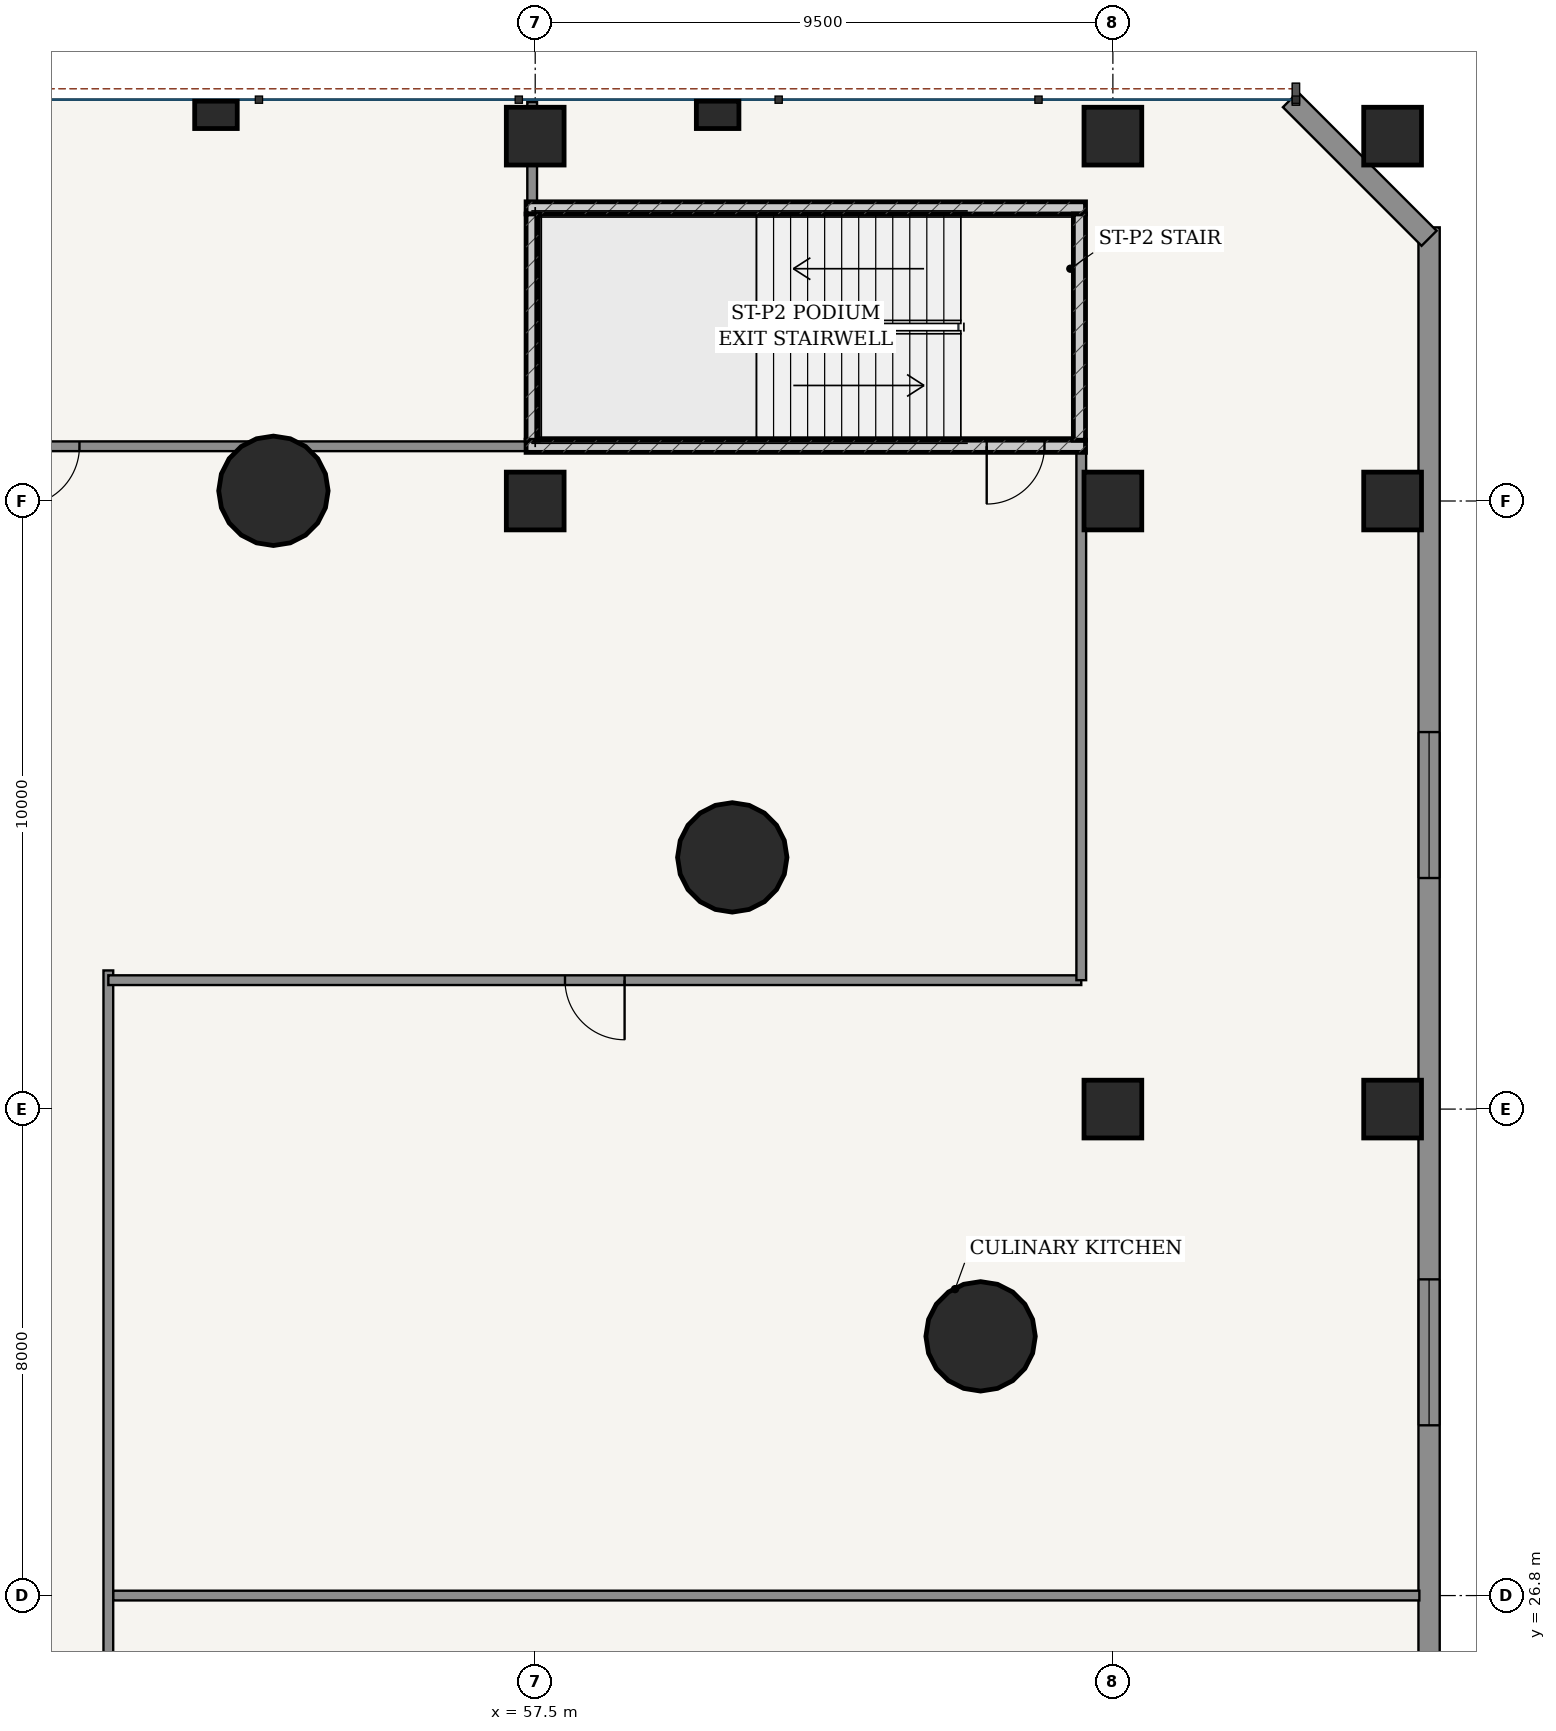
"""IFC4 building model, lengths in metres.
Left out: names, types, materials, properties, quantities, classifications, styles, units other than length and angle.
Written with IfcOpenShell. Run it as: python <this file> out.ifc"""

import sys

from ifc_helpers import new_model, si_unit, direction, frame, frame_2d, origin, origin_2d, place, context, subcontext, project, spatial, rectangle, hollow_circle, extrude, source, transform, mapped, element, fill, save


model = new_model("IFC4")
c1 = context("Model", 3, precision=1e-05, world=origin(), true_north=direction((-0.2419218956, 0.970295726276)))
c2 = subcontext(c1, "Body", "Model", "MODEL_VIEW")
j1 = project(units=[si_unit("LENGTHUNIT", "METRE"), si_unit("PLANEANGLEUNIT", "RADIAN")], contexts=[c1])
p1 = place(None, origin())
s1 = spatial("IfcSite", under=j1, at=p1, CompositionType="ELEMENT")
p2 = place(p1, origin())
s2 = spatial("IfcBuilding", under=s1, at=p2, CompositionType="ELEMENT")
p3 = place(p2, frame((0.0, 0.0, 5.4)))
s3 = spatial("IfcBuildingStorey", under=s2, at=p3, CompositionType="ELEMENT", Elevation=5.4)
p4 = place(p3, frame((57.35, 45.7, 0.0), z_axis=(0.0, 0.0, 1.0), x_axis=(1.0, 0.0, 0.0)))
e1 = element("IfcWall", 1, at=p4, inside=s3, PredefinedType="SOLIDWALL", context=c2, shape_type="SweptSolid", body=[
    extrude(rectangle(XDim=9.2, YDim=0.2, at=frame_2d((4.6, 0.0))), origin(), (0.0, 0.0, 1.0), 4.2),
])
p5 = place(p4, frame((7.575, 0.0, 0.0)))
e2 = element("IfcOpeningElement", 2, at=p5, cuts=e1, PredefinedType="OPENING", context=c2, shape_type="SweptSolid", body=[
    extrude(rectangle(XDim=0.95, YDim=2.15, at=frame_2d((0.475, 1.075))), frame((0.0, 0.11, 0.0), z_axis=(0.0, -1.0, 0.0), x_axis=(1.0, 0.0, 0.0)), (0.0, 0.0, 1.0), 0.22),
])
p6 = place(p3, frame((57.35, 49.62, 0.0), z_axis=(0.0, 0.0, 1.0), x_axis=(1.0, 0.0, 0.0)))
e3 = element("IfcWall", 3, at=p6, inside=s3, PredefinedType="SOLIDWALL", context=c2, shape_type="SweptSolid", body=[
    extrude(rectangle(XDim=9.2, YDim=0.2, at=frame_2d((4.6, 0.0))), origin(), (0.0, 0.0, 1.0), 4.2),
])
for number, where, z_axis, x_axis in (
    (4, (57.45, 45.8, 0.0), (0.0, 0.0, 1.0), (0.0, 1.0, 0.0)),
    (5, (66.45, 45.8, 0.0), (0.0, 0.0, 1.0), (0.0, 1.0, 0.0)),
):
    element("IfcWall", number, at=place(p3, frame(where, z_axis=z_axis, x_axis=x_axis)), inside=s3, PredefinedType="SOLIDWALL", context=c2, shape_type="SweptSolid", body=[
        extrude(rectangle(XDim=3.72, YDim=0.2, at=frame_2d((1.86, 0.0))), origin(), (0.0, 0.0, 1.0), 4.2),
    ])
for number, where, z_axis, x_axis in (
    (6, (64.824, 31.063, 0.0), (0.0, 0.0, 1.0), (1.0, 0.0, 0.0)),
    (7, (60.741, 38.939, 0.0), (0.0, 0.0, 1.0), (1.0, 0.0, 0.0)),
    (8, (53.195, 44.968, 0.0), (0.0, 0.0, 1.0), (1.0, 0.0, 0.0)),
):
    element("IfcColumn", number, at=place(p3, frame(where, z_axis=z_axis, x_axis=x_axis)), inside=s3, PredefinedType="COLUMN", context=c2, shape_type="SweptSolid", body=[
        extrude(hollow_circle(Radius=0.9, WallThickness=0.055, at=origin_2d()), origin(), (0.0, 0.0, 1.0), 4.5),
    ])
for number, where, z_axis, x_axis in (
    (9, (57.5, 44.8, 0.0), (0.0, 0.0, 1.0), (1.0, 0.0, 0.0)),
    (10, (57.5, 50.8, 0.0), (0.0, 0.0, 1.0), (1.0, 0.0, 0.0)),
    (11, (67.0, 34.8, 0.0), (0.0, 0.0, 1.0), (1.0, 0.0, 0.0)),
    (12, (67.0, 44.8, 0.0), (0.0, 0.0, 1.0), (1.0, 0.0, 0.0)),
    (13, (67.0, 50.8, 0.0), (0.0, 0.0, 1.0), (1.0, 0.0, 0.0)),
    (14, (71.6, 34.8, 0.0), (0.0, 0.0, 1.0), (1.0, 0.0, 0.0)),
    (15, (71.6, 44.8, 0.0), (0.0, 0.0, 1.0), (1.0, 0.0, 0.0)),
    (16, (71.6, 50.8, 0.0), (0.0, 0.0, 1.0), (1.0, 0.0, 0.0)),
):
    element("IfcColumn", number, at=place(p3, frame(where, z_axis=z_axis, x_axis=x_axis)), inside=s3, PredefinedType="COLUMN", context=c2, shape_type="SweptSolid", body=[
        extrude(rectangle(XDim=0.95, YDim=0.95, at=origin_2d()), origin(), (0.0, 0.0, 1.0), 4.5),
    ])
for number, where, z_axis, x_axis in (
    (17, (52.25, 51.15, 0.0), (0.0, 0.0, 1.0), (1.0, 0.0, 0.0)),
    (18, (60.5, 51.15, 0.0), (0.0, 0.0, 1.0), (1.0, 0.0, 0.0)),
):
    element("IfcColumn", number, at=place(p3, frame(where, z_axis=z_axis, x_axis=x_axis)), inside=s3, PredefinedType="PILASTER", context=c2, shape_type="SweptSolid", body=[
        extrude(rectangle(XDim=0.7, YDim=0.45, at=origin_2d()), origin(), (0.0, 0.0, 1.0), 4.5),
    ])
p7 = place(p3, frame((72.2, 4.3, 0.0), z_axis=(0.0, 0.0, 1.0), x_axis=(0.0, 1.0, 0.0)))
e19 = element("IfcWall", 19, at=p7, inside=s3, PredefinedType="SOLIDWALL", context=c2, shape_type="SweptSolid", body=[
    extrude(rectangle(XDim=45.0, YDim=0.35, at=frame_2d((22.5, 0.0))), origin(), (0.0, 0.0, 1.0), 4.2),
])
p8 = place(p7, frame((8.3, 0.0, 0.85)))
e20 = element("IfcOpeningElement", 20, at=p8, cuts=e19, PredefinedType="OPENING", context=c2, shape_type="SweptSolid", body=[
    extrude(rectangle(XDim=2.4, YDim=2.2, at=frame_2d((1.2, 1.1))), frame((0.0, 0.185, 0.0), z_axis=(0.0, -1.0, 0.0), x_axis=(1.0, 0.0, 0.0)), (0.0, 0.0, 1.0), 0.37),
])
p9 = place(p7, frame((25.3, 0.0, 0.85)))
e21 = element("IfcOpeningElement", 21, at=p9, cuts=e19, PredefinedType="OPENING", context=c2, shape_type="SweptSolid", body=[
    extrude(rectangle(XDim=2.4, YDim=2.2, at=frame_2d((1.2, 1.1))), frame((0.0, 0.185, 0.0), z_axis=(0.0, -1.0, 0.0), x_axis=(1.0, 0.0, 0.0)), (0.0, 0.0, 1.0), 0.37),
])
p10 = place(p7, frame((34.3, 0.0, 0.85)))
e22 = element("IfcOpeningElement", 22, at=p10, cuts=e19, PredefinedType="OPENING", context=c2, shape_type="SweptSolid", body=[
    extrude(rectangle(XDim=2.4, YDim=2.2, at=frame_2d((1.2, 1.1))), frame((0.0, 0.185, 0.0), z_axis=(0.0, -1.0, 0.0), x_axis=(1.0, 0.0, 0.0)), (0.0, 0.0, 1.0), 0.37),
])
p11 = place(p3, frame((72.2, 49.12, 0.0), z_axis=(0.0, 0.0, 1.0), x_axis=(-0.707144639935, 0.707068920411, 0.0)))
e23 = element("IfcWall", 23, at=p11, inside=s3, PredefinedType="SOLIDWALL", context=c2, shape_type="SweptSolid", body=[
    extrude(rectangle(XDim=3.224, YDim=0.35, at=frame_2d((1.612, 0.0))), origin(), (0.0, 0.0, 1.0), 3.235),
])
p12 = place(p3, frame((50.48, 15.52, 0.0), z_axis=(0.0, 0.0, 1.0), x_axis=(0.0, 1.0, 0.0)))
e24 = element("IfcWall", 24, at=p12, inside=s3, PredefinedType="PARTITIONING", context=c2, shape_type="SweptSolid", body=[
    extrude(rectangle(XDim=21.56, YDim=0.16, at=frame_2d((10.78, 0.0))), origin(), (0.0, 0.0, 1.0), 3.55),
])
p13 = place(p12, frame((5.254, 0.0, 0.0)))
e25 = element("IfcOpeningElement", 25, at=p13, cuts=e24, PredefinedType="OPENING", context=c2, shape_type="SweptSolid", body=[
    extrude(rectangle(XDim=0.98, YDim=2.2, at=frame_2d((0.49, 1.1))), frame((0.0, 0.09, 0.0), z_axis=(0.0, -1.0, 0.0), x_axis=(1.0, 0.0, 0.0)), (0.0, 0.0, 1.0), 0.18),
])
p14 = place(p3, frame((50.48, 36.92, 0.0), z_axis=(0.0, 0.0, 1.0), x_axis=(1.0, 0.0, 0.0)))
e26 = element("IfcWall", 26, at=p14, inside=s3, PredefinedType="PARTITIONING", context=c2, shape_type="SweptSolid", body=[
    extrude(rectangle(XDim=16.0, YDim=0.16, at=frame_2d((8.0, 0.0))), origin(), (0.0, 0.0, 1.0), 3.55),
])
p15 = place(p14, frame((7.51, 0.0, 0.0)))
e27 = element("IfcOpeningElement", 27, at=p15, cuts=e26, PredefinedType="OPENING", context=c2, shape_type="SweptSolid", body=[
    extrude(rectangle(XDim=0.98, YDim=2.2, at=frame_2d((0.49, 1.1))), frame((0.0, 0.09, 0.0), z_axis=(0.0, -1.0, 0.0), x_axis=(1.0, 0.0, 0.0)), (0.0, 0.0, 1.0), 0.18),
])
p16 = place(p3, frame((66.48, 36.92, 0.0), z_axis=(0.0, 0.0, 1.0), x_axis=(0.0, 1.0, 0.0)))
e28 = element("IfcWall", 28, at=p16, inside=s3, PredefinedType="PARTITIONING", context=c2, shape_type="SweptSolid", body=[
    extrude(rectangle(XDim=8.78, YDim=0.16, at=frame_2d((4.39, 0.0))), origin(), (0.0, 0.0, 1.0), 3.569),
])
p17 = place(p3, frame((18.55, 45.7, 0.0), z_axis=(0.0, 0.0, 1.0), x_axis=(1.0, 0.0, 0.0)))
e29 = element("IfcWall", 29, at=p17, inside=s3, PredefinedType="PARTITIONING", context=c2, shape_type="SweptSolid", body=[
    extrude(rectangle(XDim=38.9, YDim=0.16, at=frame_2d((19.45, 0.0))), origin(), (0.0, 0.0, 1.0), 3.55),
])
p18 = place(p17, frame((7.505, 0.0, 0.0)))
e30 = element("IfcOpeningElement", 30, at=p18, cuts=e29, PredefinedType="OPENING", context=c2, shape_type="SweptSolid", body=[
    extrude(rectangle(XDim=0.86, YDim=2.1, at=frame_2d((0.43, 1.05))), frame((0.0, 0.09, 0.0), z_axis=(0.0, -1.0, 0.0), x_axis=(1.0, 0.0, 0.0)), (0.0, 0.0, 1.0), 0.18),
])
p19 = place(p17, frame((19.02, 0.0, 0.0)))
e31 = element("IfcOpeningElement", 31, at=p19, cuts=e29, PredefinedType="OPENING", context=c2, shape_type="SweptSolid", body=[
    extrude(rectangle(XDim=0.86, YDim=2.1, at=frame_2d((0.43, 1.05))), frame((0.0, 0.09, 0.0), z_axis=(0.0, -1.0, 0.0), x_axis=(1.0, 0.0, 0.0)), (0.0, 0.0, 1.0), 0.18),
])
p20 = place(p17, frame((30.475, 0.0, 0.0)))
e32 = element("IfcOpeningElement", 32, at=p20, cuts=e29, PredefinedType="OPENING", context=c2, shape_type="SweptSolid", body=[
    extrude(rectangle(XDim=0.98, YDim=2.2, at=frame_2d((0.49, 1.1))), frame((0.0, 0.09, 0.0), z_axis=(0.0, -1.0, 0.0), x_axis=(1.0, 0.0, 0.0)), (0.0, 0.0, 1.0), 0.18),
])
p21 = place(p3, frame((50.562, 26.8, 0.0), z_axis=(0.0, 0.0, 1.0), x_axis=(1.0, 0.0, 0.0)))
e33 = element("IfcWall", 33, at=p21, inside=s3, PredefinedType="PARTITIONING", context=c2, shape_type="SweptSolid", body=[
    extrude(rectangle(XDim=21.478, YDim=0.16, at=frame_2d((10.739, 0.0))), origin(), (0.0, 0.0, 1.0), 3.642),
])
p22 = place(p3, frame((57.45, 49.722, 0.0), z_axis=(0.0, 0.0, 1.0), x_axis=(0.0, 1.0, 0.0)))
e34 = element("IfcWall", 34, at=p22, inside=s3, PredefinedType="PARTITIONING", context=c2, shape_type="SweptSolid", body=[
    extrude(rectangle(XDim=1.638, YDim=0.16, at=frame_2d((0.819, 0.0))), origin(), (0.0, 0.0, 1.0), 3.235),
])
m1 = source(origin(), c2, "Body", "SweptSolid", [
    extrude(rectangle(XDim=2.4, YDim=2.2, at=frame_2d((1.2, 1.1))), frame((0.0, 0.03, 0.0), z_axis=(0.0, -1.0, 0.0), x_axis=(1.0, 0.0, 0.0)), (0.0, 0.0, 1.0), 0.06),
])
p23 = place(p9, origin())
e35 = element("IfcWindow", 35, at=p23, inside=s3, PartitioningType="SINGLE_PANEL", PredefinedType="WINDOW", context=c2, shape_type="MappedRepresentation", body=[
    mapped(m1, transform((0.0, 0.0, 0.0), scale=1.0)),
])
fill(e21, e35)
p24 = place(p10, origin())
e36 = element("IfcWindow", 36, at=p24, inside=s3, PartitioningType="SINGLE_PANEL", PredefinedType="WINDOW", context=c2, shape_type="MappedRepresentation", body=[
    mapped(m1, transform((0.0, 0.0, 0.0), scale=1.0)),
])
fill(e22, e36)
m2 = source(origin(), c2, "Body", "SweptSolid", [
    extrude(rectangle(XDim=0.95, YDim=2.15, at=frame_2d((0.475, 1.075))), frame((0.0, 0.025, 0.0), z_axis=(0.0, -1.0, 0.0), x_axis=(1.0, 0.0, 0.0)), (0.0, 0.0, 1.0), 0.05),
])
p25 = place(p5, frame((0.95, 0.0, 0.0), z_axis=(0.0, 0.0, 1.0), x_axis=(-1.0, 0.0, 0.0)))
e37 = element("IfcDoor", 37, at=p25, inside=s3, OperationType="SINGLE_SWING_RIGHT", PredefinedType="DOOR", context=c2, shape_type="MappedRepresentation", body=[
    mapped(m2, transform((0.0, 0.0, 0.0), scale=1.0)),
])
fill(e2, e37)
m3 = source(origin(), c2, "Body", "SweptSolid", [
    extrude(rectangle(XDim=0.98, YDim=2.2, at=frame_2d((0.49, 1.1))), frame((0.0, 0.025, 0.0), z_axis=(0.0, -1.0, 0.0), x_axis=(1.0, 0.0, 0.0)), (0.0, 0.0, 1.0), 0.05),
])
p26 = place(p15, frame((0.98, 0.0, 0.0), z_axis=(0.0, 0.0, 1.0), x_axis=(-1.0, 0.0, 0.0)))
e38 = element("IfcDoor", 38, at=p26, inside=s3, OperationType="SINGLE_SWING_LEFT", PredefinedType="DOOR", context=c2, shape_type="MappedRepresentation", body=[
    mapped(m3, transform((0.0, 0.0, 0.0), scale=1.0)),
])
fill(e27, e38)
p27 = place(p20, frame((0.98, 0.0, 0.0), z_axis=(0.0, 0.0, 1.0), x_axis=(-1.0, 0.0, 0.0)))
e39 = element("IfcDoor", 39, at=p27, inside=s3, OperationType="SINGLE_SWING_RIGHT", PredefinedType="DOOR", context=c2, shape_type="MappedRepresentation", body=[
    mapped(m3, transform((0.0, 0.0, 0.0), scale=1.0)),
])
fill(e32, e39)
save(model, sys.argv[1])
